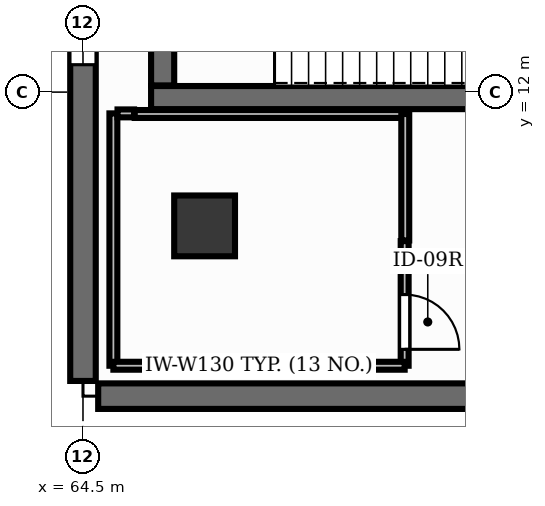
"""IFC4 building model, lengths in metres.
Left out: names, types, materials, properties, quantities, classifications, styles, units other than length and angle.
Written with IfcOpenShell. Run it as: python <this file> out.ifc"""

import sys

from ifc_helpers import new_model, si_unit, direction, frame, frame_2d, origin, origin_2d, place, context, subcontext, project, spatial, rectangle, extrude, element, fill, save


model = new_model("IFC4")
c1 = context("Model", 3, precision=1e-05, world=origin(), true_north=direction((0.0, 1.0)))
c2 = subcontext(c1, "Body", "Model", "MODEL_VIEW")
j1 = project(units=[si_unit("LENGTHUNIT", "METRE"), si_unit("PLANEANGLEUNIT", "RADIAN")], contexts=[c1])
p1 = place(None, origin())
s1 = spatial("IfcSite", under=j1, at=p1, CompositionType="ELEMENT")
p2 = place(p1, origin())
s2 = spatial("IfcBuilding", under=s1, at=p2, CompositionType="ELEMENT")
p3 = place(p2, frame((0.0, 0.0, 15.0)))
s3 = spatial("IfcBuildingStorey", under=s2, at=p3, CompositionType="ELEMENT", Elevation=15.0)
p4 = place(p3, frame((66.5, 9.8, 0.0), z_axis=(0.0, 0.0, 1.0), x_axis=(1.0, 0.0, 0.0)))
e1 = element("IfcColumn", 1, at=p4, inside=s3, PredefinedType="COLUMN", context=c2, shape_type="SweptSolid", body=[
    extrude(rectangle(XDim=1.0, YDim=1.0, at=origin_2d()), origin(), (0.0, 0.0, 1.0), 5.1),
])
p5 = place(p3, frame((64.5, 7.25, 0.0), z_axis=(0.0, 0.0, 1.0), x_axis=(0.0, 1.0, 0.0)))
e2 = element("IfcWall", 2, at=p5, inside=s3, PredefinedType="SHEAR", context=c2, shape_type="SweptSolid", body=[
    extrude(rectangle(XDim=39.5, YDim=0.42, at=frame_2d((19.75, 0.0))), origin(), (0.0, 0.0, 1.0), 5.1),
])
p6 = place(p5, frame((5.2, 0.0, 0.9)))
e3 = element("IfcOpeningElement", 3, at=p6, cuts=e2, PredefinedType="OPENING", context=c2, shape_type="SweptSolid", body=[
    extrude(rectangle(XDim=1.2, YDim=2.7, at=frame_2d((0.6, 1.35))), frame((0.0, 0.225, 0.0), z_axis=(0.0, -1.0, 0.0), x_axis=(1.0, 0.0, 0.0)), (0.0, 0.0, 1.0), 0.45),
])
p7 = place(p5, frame((12.2, 0.0, 0.9)))
e4 = element("IfcOpeningElement", 4, at=p7, cuts=e2, PredefinedType="OPENING", context=c2, shape_type="SweptSolid", body=[
    extrude(rectangle(XDim=1.2, YDim=2.7, at=frame_2d((0.6, 1.35))), frame((0.0, 0.225, 0.0), z_axis=(0.0, -1.0, 0.0), x_axis=(1.0, 0.0, 0.0)), (0.0, 0.0, 1.0), 0.45),
])
p8 = place(p5, frame((25.0, 0.0, 0.9)))
e5 = element("IfcOpeningElement", 5, at=p8, cuts=e2, PredefinedType="OPENING", context=c2, shape_type="SweptSolid", body=[
    extrude(rectangle(XDim=1.2, YDim=2.7, at=frame_2d((0.6, 1.35))), frame((0.0, 0.225, 0.0), z_axis=(0.0, -1.0, 0.0), x_axis=(1.0, 0.0, 0.0)), (0.0, 0.0, 1.0), 0.45),
])
p9 = place(p5, frame((31.8, 0.0, 0.9)))
e6 = element("IfcOpeningElement", 6, at=p9, cuts=e2, PredefinedType="OPENING", context=c2, shape_type="SweptSolid", body=[
    extrude(rectangle(XDim=1.2, YDim=2.7, at=frame_2d((0.6, 1.35))), frame((0.0, 0.225, 0.0), z_axis=(0.0, -1.0, 0.0), x_axis=(1.0, 0.0, 0.0)), (0.0, 0.0, 1.0), 0.45),
])
p10 = place(p3, frame((94.25, 7.0, 0.0), z_axis=(0.0, 0.0, 1.0), x_axis=(-1.0, 0.0, 0.0)))
e7 = element("IfcWall", 7, at=p10, inside=s3, PredefinedType="SHEAR", context=c2, shape_type="SweptSolid", body=[
    extrude(rectangle(XDim=29.5, YDim=0.42, at=frame_2d((14.75, 0.0))), origin(), (0.0, 0.0, 1.0), 5.1),
])
p11 = place(p3, frame((65.62, 11.91, 0.0), z_axis=(0.0, 0.0, 1.0), x_axis=(1.0, 0.0, 0.0)))
e8 = element("IfcWall", 8, at=p11, inside=s3, PredefinedType="SHEAR", context=c2, shape_type="SweptSolid", body=[
    extrude(rectangle(XDim=8.61, YDim=0.38, at=frame_2d((4.305, 0.0))), origin(), (0.0, 0.0, 1.0), 5.1),
])
p12 = place(p3, frame((65.81, 12.11, 0.0), z_axis=(0.0, 0.0, 1.0), x_axis=(0.0, 1.0, 0.0)))
e9 = element("IfcWall", 9, at=p12, inside=s3, PredefinedType="SHEAR", context=c2, shape_type="SweptSolid", body=[
    extrude(rectangle(XDim=3.48, YDim=0.38, at=frame_2d((1.74, 0.0))), origin(), (0.0, 0.0, 1.0), 5.1),
])
p13 = place(p3, frame((69.79, 9.55, 0.0), z_axis=(0.0, 0.0, 1.0), x_axis=(0.0, -1.0, 0.0)))
e10 = element("IfcWall", 10, at=p13, inside=s3, PredefinedType="PARTITIONING", context=c2, shape_type="SweptSolid", body=[
    extrude(rectangle(XDim=2.05, YDim=0.13, at=frame_2d((1.025, 0.0))), origin(), (0.0, 0.0, 1.0), 3.36),
])
p14 = place(p13, frame((0.88, 0.0, 0.0)))
e11 = element("IfcOpeningElement", 11, at=p14, cuts=e10, PredefinedType="OPENING", context=c2, shape_type="SweptSolid", body=[
    extrude(rectangle(XDim=0.9, YDim=2.15, at=frame_2d((0.45, 1.075))), frame((0.0, 0.08, 0.0), z_axis=(0.0, -1.0, 0.0), x_axis=(1.0, 0.0, 0.0)), (0.0, 0.0, 1.0), 0.16),
])
p15 = place(p3, frame((65.0, 7.5, 0.0), z_axis=(0.0, 0.0, 1.0), x_axis=(0.0, 1.0, 0.0)))
e12 = element("IfcWall", 12, at=p15, inside=s3, PredefinedType="PARTITIONING", context=c2, shape_type="SweptSolid", body=[
    extrude(rectangle(XDim=4.15, YDim=0.13, at=frame_2d((2.075, 0.0))), origin(), (0.0, 0.0, 1.0), 3.36),
])
p16 = place(p3, frame((65.068, 11.65, 0.0), z_axis=(0.0, 0.0, 1.0), x_axis=(1.0, 0.0, 0.0)))
e13 = element("IfcWall", 13, at=p16, inside=s3, PredefinedType="PARTITIONING", context=c2, shape_type="SweptSolid", body=[
    extrude(rectangle(XDim=0.272, YDim=0.13, at=frame_2d((0.136, 0.0))), origin(), (0.0, 0.0, 1.0), 3.36),
])
p17 = place(p3, frame((65.35, 11.64, 0.0), z_axis=(0.0, 0.0, 1.0), x_axis=(1.0, 0.0, 0.0)))
e14 = element("IfcWall", 14, at=p17, inside=s3, PredefinedType="PARTITIONING", context=c2, shape_type="SweptSolid", body=[
    extrude(rectangle(XDim=4.45, YDim=0.13, at=frame_2d((2.225, 0.0))), origin(), (0.0, 0.0, 1.0), 3.36),
])
p18 = place(p3, frame((69.8, 11.64, 0.0), z_axis=(0.0, 0.0, 1.0), x_axis=(0.0, -1.0, 0.0)))
e15 = element("IfcWall", 15, at=p18, inside=s3, PredefinedType="PARTITIONING", context=c2, shape_type="SweptSolid", body=[
    extrude(rectangle(XDim=2.08, YDim=0.13, at=frame_2d((1.04, 0.0))), origin(), (0.0, 0.0, 1.0), 3.36),
])
p19 = place(p3, frame((69.79, 7.5, 0.0), z_axis=(0.0, 0.0, 1.0), x_axis=(-1.0, 0.0, 0.0)))
e16 = element("IfcWall", 16, at=p19, inside=s3, PredefinedType="PARTITIONING", context=c2, shape_type="SweptSolid", body=[
    extrude(rectangle(XDim=4.79, YDim=0.13, at=frame_2d((2.395, 0.0))), origin(), (0.0, 0.0, 1.0), 3.36),
])
p20 = place(p6, origin())
e17 = element("IfcWindow", 17, at=p20, inside=s3, PartitioningType="SINGLE_PANEL", PredefinedType="WINDOW", context=c2, shape_type="SweptSolid", body=[
    extrude(rectangle(XDim=1.2, YDim=2.7, at=frame_2d((0.6, 1.35))), frame((0.0, 0.03, 0.0), z_axis=(0.0, -1.0, 0.0), x_axis=(1.0, 0.0, 0.0)), (0.0, 0.0, 1.0), 0.06),
])
fill(e3, e17)
p21 = place(p14, origin())
e18 = element("IfcDoor", 18, at=p21, inside=s3, OperationType="SINGLE_SWING_RIGHT", PredefinedType="DOOR", context=c2, shape_type="SweptSolid", body=[
    extrude(rectangle(XDim=0.9, YDim=2.15, at=frame_2d((0.45, 1.075))), frame((0.0, 0.025, 0.0), z_axis=(0.0, -1.0, 0.0), x_axis=(1.0, 0.0, 0.0)), (0.0, 0.0, 1.0), 0.05),
])
fill(e11, e18)
save(model, sys.argv[1])
